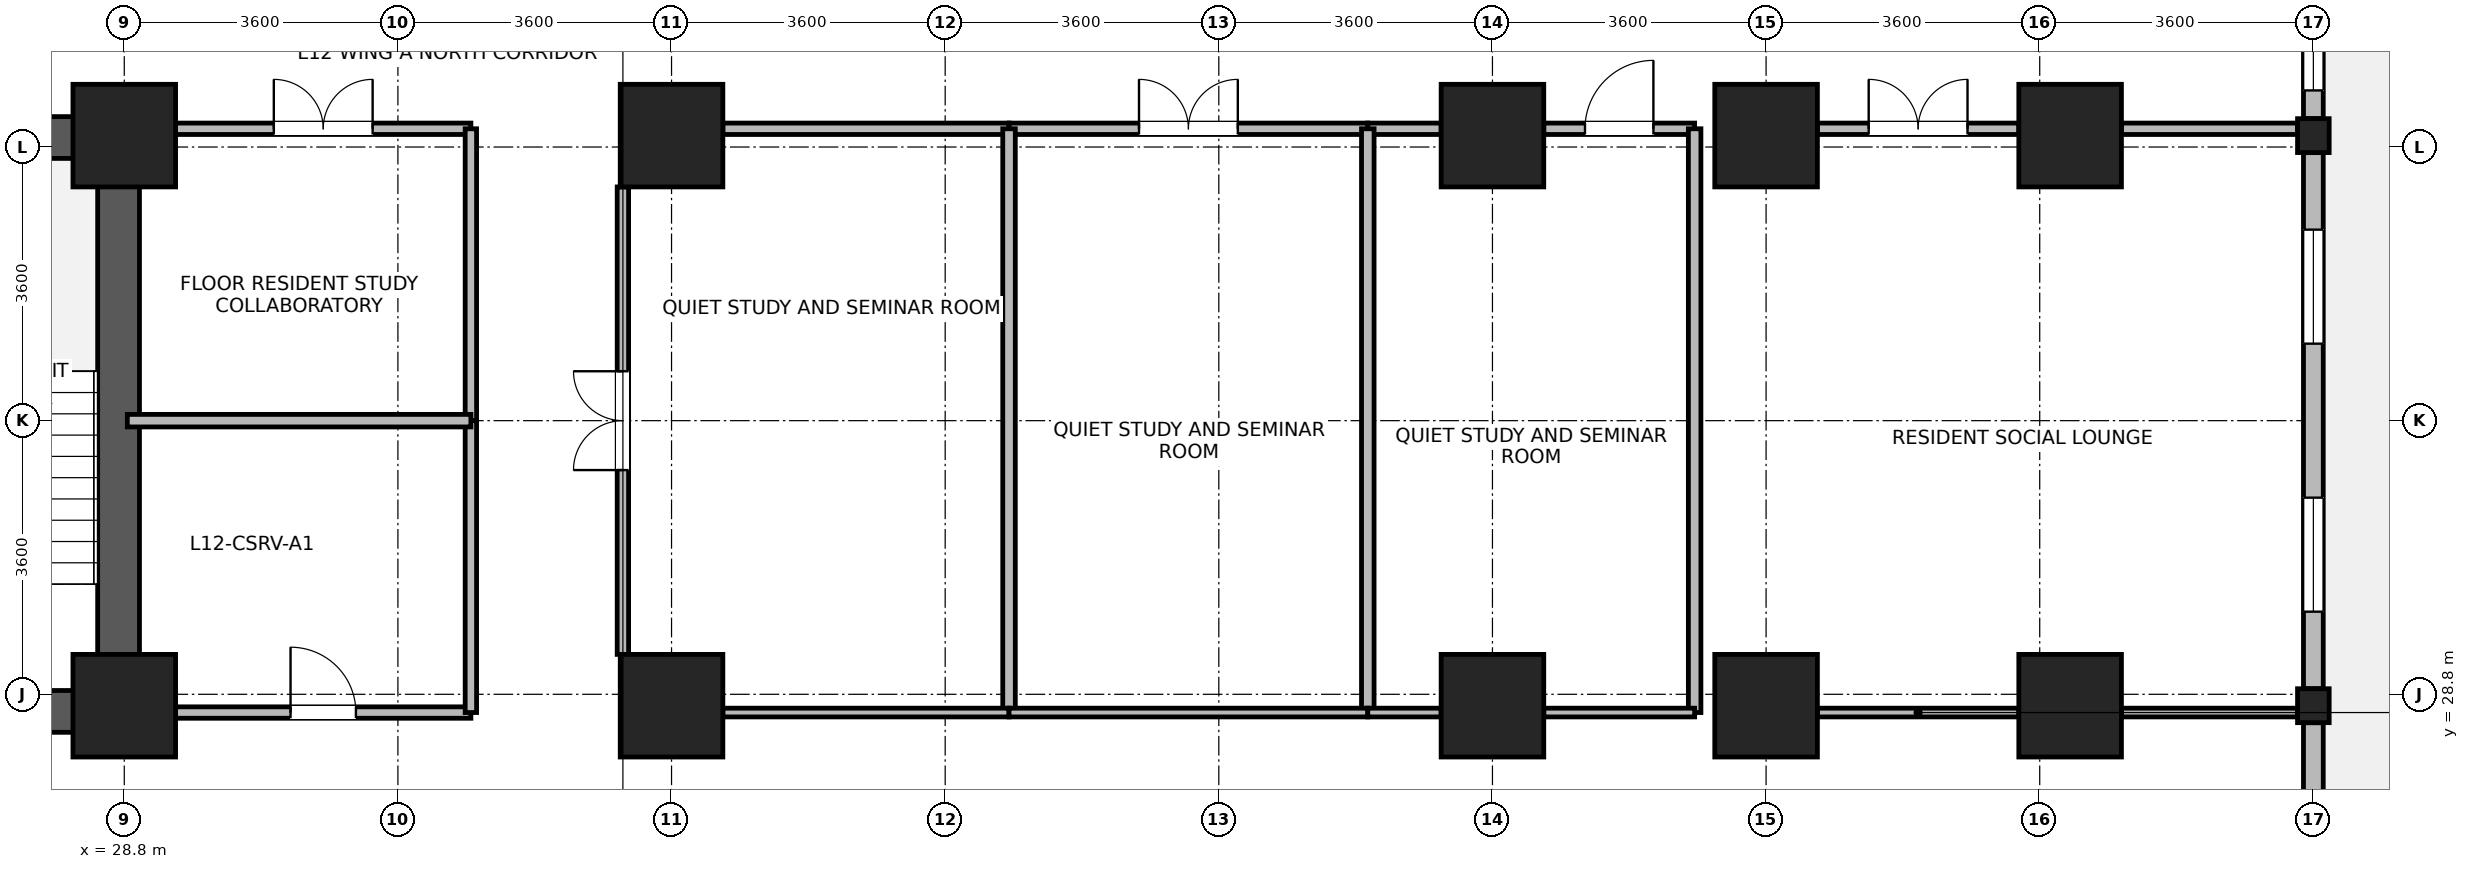
"""IFC4 building model, lengths in metres.
Left out: names, types, materials, properties, quantities, classifications, styles, units other than length and angle.
Written with IfcOpenShell. Run it as: python <this file> out.ifc"""

import sys

from ifc_helpers import new_model, si_unit, direction, frame, frame_2d, origin, origin_2d, place, context, subcontext, project, spatial, rectangle, i_section, extrude, source, transform, mapped, element, fill, save


model = new_model("IFC4")
c1 = context("Model", 3, precision=1e-05, world=origin(), true_north=direction((0.0, 1.0)))
c2 = subcontext(c1, "Body", "Model", "MODEL_VIEW")
j1 = project(units=[si_unit("LENGTHUNIT", "METRE"), si_unit("PLANEANGLEUNIT", "RADIAN")], contexts=[c1])
p1 = place(None, origin())
s1 = spatial("IfcSite", under=j1, at=p1, CompositionType="ELEMENT")
p2 = place(p1, origin())
s2 = spatial("IfcBuilding", under=s1, at=p2, CompositionType="ELEMENT")
p3 = place(p2, frame((0.0, 0.0, 51.2)))
s3 = spatial("IfcBuildingStorey", under=s2, at=p3, CompositionType="ELEMENT", Elevation=51.2)
p4 = place(p3, frame((28.725, 28.3, 0.0), z_axis=(0.0, 0.0, 1.0), x_axis=(0.0, 1.0, 0.0)))
e1 = element("IfcWall", 1, at=p4, inside=s3, PredefinedType="SHEAR", context=c2, shape_type="SweptSolid", body=[
    extrude(rectangle(XDim=8.1, YDim=0.55, at=frame_2d((4.05, 0.0))), origin(), (0.0, 0.0, 1.0), 3.45),
])
for number, where, z_axis, x_axis in (
    (2, (25.25, 28.575, 0.0), (0.0, 0.0, 1.0), (1.0, 0.0, 0.0)),
    (3, (25.25, 36.125, 0.0), (0.0, 0.0, 1.0), (1.0, 0.0, 0.0)),
):
    element("IfcWall", number, at=place(p3, frame(where, z_axis=z_axis, x_axis=x_axis)), inside=s3, PredefinedType="SHEAR", context=c2, shape_type="SweptSolid", body=[
        extrude(rectangle(XDim=3.2, YDim=0.55, at=frame_2d((1.6, 0.0))), origin(), (0.0, 0.0, 1.0), 3.45),
    ])
m1 = source(origin(), c2, "Body", "SweptSolid", [
    extrude(rectangle(XDim=1.35, YDim=1.35, at=origin_2d()), origin(), (0.0, 0.0, 1.0), 3.7),
])
for number, where, z_axis, x_axis in (
    (4, (28.8, 28.65, 0.0), (0.0, 0.0, 1.0), (1.0, 0.0, 0.0)),
    (5, (28.8, 36.15, 0.0), (0.0, 0.0, 1.0), (1.0, 0.0, 0.0)),
    (6, (36.0, 28.65, 0.0), (0.0, 0.0, 1.0), (1.0, 0.0, 0.0)),
    (7, (36.0, 36.15, 0.0), (0.0, 0.0, 1.0), (1.0, 0.0, 0.0)),
    (8, (46.8, 28.65, 0.0), (0.0, 0.0, 1.0), (1.0, 0.0, 0.0)),
    (9, (46.8, 36.15, 0.0), (0.0, 0.0, 1.0), (1.0, 0.0, 0.0)),
    (10, (50.4, 28.65, 0.0), (0.0, 0.0, 1.0), (1.0, 0.0, 0.0)),
    (11, (50.4, 36.15, 0.0), (0.0, 0.0, 1.0), (1.0, 0.0, 0.0)),
    (12, (54.4, 28.65, 0.0), (0.0, 0.0, 1.0), (1.0, 0.0, 0.0)),
    (13, (54.4, 36.15, 0.0), (0.0, 0.0, 1.0), (1.0, 0.0, 0.0)),
):
    element("IfcColumn", number, at=place(p3, frame(where, z_axis=z_axis, x_axis=x_axis)), inside=s3, PredefinedType="COLUMN", context=c2, shape_type="MappedRepresentation", body=[
        mapped(m1, transform((0.0, 0.0, 0.0), x_axis=(1.0, 0.0, 0.0), y_axis=(0.0, 1.0, 0.0), z_axis=(0.0, 0.0, 1.0), scale=1.0)),
    ])
m2 = source(origin(), c2, "Body", "SweptSolid", [
    extrude(i_section(OverallWidth=0.416, OverallDepth=0.446, WebThickness=0.029, FlangeThickness=0.04, FilletRadius=0.015, at=origin_2d()), origin(), (0.0, 0.0, 1.0), 3.7),
])
for number, where, z_axis, x_axis in (
    (14, (57.6, 28.65, 0.0), (0.0, 0.0, 1.0), (1.0, 0.0, 0.0)),
    (15, (57.6, 36.15, 0.0), (0.0, 0.0, 1.0), (1.0, 0.0, 0.0)),
):
    element("IfcColumn", number, at=place(p3, frame(where, z_axis=z_axis, x_axis=x_axis)), inside=s3, PredefinedType="COLUMN", context=c2, shape_type="MappedRepresentation", body=[
        mapped(m2, transform((0.0, 0.0, 0.0), x_axis=(1.0, 0.0, 0.0), y_axis=(0.0, 1.0, 0.0), z_axis=(0.0, 0.0, 1.0), scale=1.0)),
    ])
p5 = place(p3, frame((57.6, 28.426, 0.0), z_axis=(0.0, 0.0, 1.0), x_axis=(0.0, -1.0, 0.0)))
e16 = element("IfcWall", 16, at=p5, inside=s3, PredefinedType="STANDARD", context=c2, shape_type="SweptSolid", body=[
    extrude(rectangle(XDim=6.602, YDim=0.26, at=frame_2d((3.301, 0.0))), origin(), (0.0, 0.0, 1.0), 2.93),
])
p6 = place(p5, frame((4.201, 0.0, 0.85)))
e17 = element("IfcOpeningElement", 17, at=p6, cuts=e16, PredefinedType="OPENING", context=c2, shape_type="SweptSolid", body=[
    extrude(rectangle(XDim=1.5, YDim=1.85, at=frame_2d((0.75, 0.925))), frame((0.0, 0.14, 0.0), z_axis=(0.0, -1.0, 0.0), x_axis=(1.0, 0.0, 0.0)), (0.0, 0.0, 1.0), 0.28),
])
p7 = place(p5, frame((2.826, 0.0, 0.85)))
e18 = element("IfcOpeningElement", 18, at=p7, cuts=e16, PredefinedType="OPENING", context=c2, shape_type="SweptSolid", body=[
    extrude(rectangle(XDim=0.95, YDim=1.75, at=frame_2d((0.475, 0.875))), frame((0.0, 0.14, 0.0), z_axis=(0.0, -1.0, 0.0), x_axis=(1.0, 0.0, 0.0)), (0.0, 0.0, 1.0), 0.28),
])
p8 = place(p3, frame((57.6, 35.926, 0.0), z_axis=(0.0, 0.0, 1.0), x_axis=(0.0, -1.0, 0.0)))
e19 = element("IfcWall", 19, at=p8, inside=s3, PredefinedType="STANDARD", context=c2, shape_type="SweptSolid", body=[
    extrude(rectangle(XDim=7.052, YDim=0.26, at=frame_2d((3.526, 0.0))), origin(), (0.0, 0.0, 1.0), 2.93),
])
p9 = place(p8, frame((1.013, 0.0, 0.85)))
e20 = element("IfcOpeningElement", 20, at=p9, cuts=e19, PredefinedType="OPENING", context=c2, shape_type="SweptSolid", body=[
    extrude(rectangle(XDim=1.5, YDim=1.85, at=frame_2d((0.75, 0.925))), frame((0.0, 0.14, 0.0), z_axis=(0.0, -1.0, 0.0), x_axis=(1.0, 0.0, 0.0)), (0.0, 0.0, 1.0), 0.28),
])
p10 = place(p8, frame((4.539, 0.0, 0.85)))
e21 = element("IfcOpeningElement", 21, at=p10, cuts=e19, PredefinedType="OPENING", context=c2, shape_type="SweptSolid", body=[
    extrude(rectangle(XDim=1.5, YDim=1.85, at=frame_2d((0.75, 0.925))), frame((0.0, 0.14, 0.0), z_axis=(0.0, -1.0, 0.0), x_axis=(1.0, 0.0, 0.0)), (0.0, 0.0, 1.0), 0.28),
])
p11 = place(p3, frame((57.6, 39.73, 0.0), z_axis=(0.0, 0.0, 1.0), x_axis=(0.0, -1.0, 0.0)))
e22 = element("IfcWall", 22, at=p11, inside=s3, PredefinedType="STANDARD", context=c2, shape_type="SweptSolid", body=[
    extrude(rectangle(XDim=3.356, YDim=0.26, at=frame_2d((1.678, 0.0))), origin(), (0.0, 0.0, 1.0), 3.43),
])
p12 = place(p11, frame((2.035, 0.0, 0.85)))
e23 = element("IfcOpeningElement", 23, at=p12, cuts=e22, PredefinedType="OPENING", context=c2, shape_type="SweptSolid", body=[
    extrude(rectangle(XDim=0.95, YDim=1.75, at=frame_2d((0.475, 0.875))), frame((0.0, 0.14, 0.0), z_axis=(0.0, -1.0, 0.0), x_axis=(1.0, 0.0, 0.0)), (0.0, 0.0, 1.0), 0.28),
])
p13 = place(p11, frame((0.263, 0.0, 0.85)))
e24 = element("IfcOpeningElement", 24, at=p13, cuts=e22, PredefinedType="OPENING", context=c2, shape_type="SweptSolid", body=[
    extrude(rectangle(XDim=0.95, YDim=1.75, at=frame_2d((0.475, 0.875))), frame((0.0, 0.14, 0.0), z_axis=(0.0, -1.0, 0.0), x_axis=(1.0, 0.0, 0.0)), (0.0, 0.0, 1.0), 0.28),
])
p14 = place(p3, frame((51.075, 36.24, 0.0), z_axis=(0.0, 0.0, 1.0), x_axis=(1.0, 0.0, 0.0)))
e25 = element("IfcWall", 25, at=p14, inside=s3, PredefinedType="PARTITIONING", context=c2, shape_type="SweptSolid", body=[
    extrude(rectangle(XDim=2.65, YDim=0.15, at=frame_2d((1.325, 0.0))), origin(), (0.0, 0.0, 1.0), 2.78),
])
p15 = place(p14, frame((0.675, 0.0, 0.0)))
e26 = element("IfcOpeningElement", 26, at=p15, cuts=e25, PredefinedType="OPENING", context=c2, shape_type="SweptSolid", body=[
    extrude(rectangle(XDim=1.3, YDim=2.12, at=frame_2d((0.65, 1.06))), frame((0.0, 0.085, 0.0), z_axis=(0.0, -1.0, 0.0), x_axis=(1.0, 0.0, 0.0)), (0.0, 0.0, 1.0), 0.17),
])
p16 = place(p3, frame((55.075, 36.24, 0.0), z_axis=(0.0, 0.0, 1.0), x_axis=(1.0, 0.0, 0.0)))
e27 = element("IfcWall", 27, at=p16, inside=s3, PredefinedType="PARTITIONING", context=c2, shape_type="SweptSolid", body=[
    extrude(rectangle(XDim=2.317, YDim=0.15, at=frame_2d((1.159, 0.0))), origin(), (0.0, 0.0, 1.0), 2.78),
])
p17 = place(p3, frame((35.36, 29.325, 0.0), z_axis=(0.0, 0.0, 1.0), x_axis=(0.0, 1.0, 0.0)))
e28 = element("IfcWall", 28, at=p17, inside=s3, PredefinedType="PARTITIONING", context=c2, shape_type="SweptSolid", body=[
    extrude(rectangle(XDim=6.15, YDim=0.15, at=frame_2d((3.075, 0.0))), origin(), (0.0, 0.0, 1.0), 3.43),
])
p18 = place(p17, frame((2.425, 0.0, 0.0)))
e29 = element("IfcOpeningElement", 29, at=p18, cuts=e28, PredefinedType="OPENING", context=c2, shape_type="SweptSolid", body=[
    extrude(rectangle(XDim=1.3, YDim=2.12, at=frame_2d((0.65, 1.06))), frame((0.0, 0.085, 0.0), z_axis=(0.0, -1.0, 0.0), x_axis=(1.0, 0.0, 0.0)), (0.0, 0.0, 1.0), 0.17),
])
p19 = place(p3, frame((36.675, 36.24, 0.0), z_axis=(0.0, 0.0, 1.0), x_axis=(1.0, 0.0, 0.0)))
e30 = element("IfcWall", 30, at=p19, inside=s3, PredefinedType="PARTITIONING", context=c2, shape_type="SweptSolid", body=[
    extrude(rectangle(XDim=3.765, YDim=0.15, at=frame_2d((1.882, 0.0))), origin(), (0.0, 0.0, 1.0), 2.78),
])
p20 = place(p3, frame((40.44, 36.24, 0.0), z_axis=(0.0, 0.0, 1.0), x_axis=(1.0, 0.0, 0.0)))
e31 = element("IfcWall", 31, at=p20, inside=s3, PredefinedType="PARTITIONING", context=c2, shape_type="SweptSolid", body=[
    extrude(rectangle(XDim=4.72, YDim=0.15, at=frame_2d((2.36, 0.0))), origin(), (0.0, 0.0, 1.0), 2.78),
])
p21 = place(p20, frame((1.71, 0.0, 0.0)))
e32 = element("IfcOpeningElement", 32, at=p21, cuts=e31, PredefinedType="OPENING", context=c2, shape_type="SweptSolid", body=[
    extrude(rectangle(XDim=1.3, YDim=2.12, at=frame_2d((0.65, 1.06))), frame((0.0, 0.085, 0.0), z_axis=(0.0, -1.0, 0.0), x_axis=(1.0, 0.0, 0.0)), (0.0, 0.0, 1.0), 0.17),
])
p22 = place(p3, frame((29.475, 28.56, 0.0), z_axis=(0.0, 0.0, 1.0), x_axis=(1.0, 0.0, 0.0)))
e33 = element("IfcWall", 33, at=p22, inside=s3, PredefinedType="PARTITIONING", context=c2, shape_type="SweptSolid", body=[
    extrude(rectangle(XDim=3.885, YDim=0.15, at=frame_2d((1.942, 0.0))), origin(), (0.0, 0.0, 1.0), 2.78),
])
p23 = place(p22, frame((1.512, 0.0, 0.0)))
e34 = element("IfcOpeningElement", 34, at=p23, cuts=e33, PredefinedType="OPENING", context=c2, shape_type="SweptSolid", body=[
    extrude(rectangle(XDim=0.86, YDim=2.02, at=frame_2d((0.43, 1.01))), frame((0.0, 0.085, 0.0), z_axis=(0.0, -1.0, 0.0), x_axis=(1.0, 0.0, 0.0)), (0.0, 0.0, 1.0), 0.17),
])
p24 = place(p3, frame((29.475, 36.24, 0.0), z_axis=(0.0, 0.0, 1.0), x_axis=(1.0, 0.0, 0.0)))
e35 = element("IfcWall", 35, at=p24, inside=s3, PredefinedType="PARTITIONING", context=c2, shape_type="SweptSolid", body=[
    extrude(rectangle(XDim=3.885, YDim=0.15, at=frame_2d((1.942, 0.0))), origin(), (0.0, 0.0, 1.0), 2.78),
])
p25 = place(p24, frame((1.292, 0.0, 0.0)))
e36 = element("IfcOpeningElement", 36, at=p25, cuts=e35, PredefinedType="OPENING", context=c2, shape_type="SweptSolid", body=[
    extrude(rectangle(XDim=1.3, YDim=2.12, at=frame_2d((0.65, 1.06))), frame((0.0, 0.085, 0.0), z_axis=(0.0, -1.0, 0.0), x_axis=(1.0, 0.0, 0.0)), (0.0, 0.0, 1.0), 0.17),
])
p26 = place(p3, frame((45.16, 36.24, 0.0), z_axis=(0.0, 0.0, 1.0), x_axis=(1.0, 0.0, 0.0)))
e37 = element("IfcWall", 37, at=p26, inside=s3, PredefinedType="PARTITIONING", context=c2, shape_type="SweptSolid", body=[
    extrude(rectangle(XDim=0.965, YDim=0.15, at=frame_2d((0.482, 0.0))), origin(), (0.0, 0.0, 1.0), 2.78),
])
p27 = place(p3, frame((47.475, 36.24, 0.0), z_axis=(0.0, 0.0, 1.0), x_axis=(1.0, 0.0, 0.0)))
e38 = element("IfcWall", 38, at=p27, inside=s3, PredefinedType="PARTITIONING", context=c2, shape_type="SweptSolid", body=[
    extrude(rectangle(XDim=1.985, YDim=0.15, at=frame_2d((0.992, 0.0))), origin(), (0.0, 0.0, 1.0), 2.78),
])
p28 = place(p27, frame((0.542, 0.0, 0.0)))
e39 = element("IfcOpeningElement", 39, at=p28, cuts=e38, PredefinedType="OPENING", context=c2, shape_type="SweptSolid", body=[
    extrude(rectangle(XDim=0.9, YDim=2.08, at=frame_2d((0.45, 1.04))), frame((0.0, 0.085, 0.0), z_axis=(0.0, -1.0, 0.0), x_axis=(1.0, 0.0, 0.0)), (0.0, 0.0, 1.0), 0.17),
])
p29 = place(p3, frame((33.36, 32.4, 0.0), z_axis=(0.0, 0.0, 1.0), x_axis=(0.0, 1.0, 0.0)))
e40 = element("IfcWall", 40, at=p29, inside=s3, PredefinedType="PARTITIONING", context=c2, shape_type="SweptSolid", body=[
    extrude(rectangle(XDim=3.84, YDim=0.15, at=frame_2d((1.92, 0.0))), origin(), (0.0, 0.0, 1.0), 3.43),
])
p30 = place(p3, frame((33.36, 28.56, 0.0), z_axis=(0.0, 0.0, 1.0), x_axis=(0.0, 1.0, 0.0)))
e41 = element("IfcWall", 41, at=p30, inside=s3, PredefinedType="PARTITIONING", context=c2, shape_type="SweptSolid", body=[
    extrude(rectangle(XDim=3.84, YDim=0.15, at=frame_2d((1.92, 0.0))), origin(), (0.0, 0.0, 1.0), 3.43),
])
p31 = place(p3, frame((51.075, 28.56, 0.0), z_axis=(0.0, 0.0, 1.0), x_axis=(1.0, 0.0, 0.0)))
e42 = element("IfcWall", 42, at=p31, inside=s3, PredefinedType="PARTITIONING", context=c2, shape_type="SweptSolid", body=[
    extrude(rectangle(XDim=2.65, YDim=0.115, at=frame_2d((1.325, 0.0))), origin(), (0.0, 0.0, 1.0), 2.78),
])
p32 = place(p3, frame((55.075, 28.56, 0.0), z_axis=(0.0, 0.0, 1.0), x_axis=(1.0, 0.0, 0.0)))
e43 = element("IfcWall", 43, at=p32, inside=s3, PredefinedType="PARTITIONING", context=c2, shape_type="SweptSolid", body=[
    extrude(rectangle(XDim=2.317, YDim=0.115, at=frame_2d((1.159, 0.0))), origin(), (0.0, 0.0, 1.0), 2.78),
])
for number, where, z_axis, x_axis in (
    (44, (40.44, 28.56, 0.0), (0.0, 0.0, 1.0), (0.0, 1.0, 0.0)),
    (45, (45.16, 28.56, 0.0), (0.0, 0.0, 1.0), (0.0, 1.0, 0.0)),
    (46, (49.46, 28.56, 0.0), (0.0, 0.0, 1.0), (0.0, 1.0, 0.0)),
):
    element("IfcWall", number, at=place(p3, frame(where, z_axis=z_axis, x_axis=x_axis)), inside=s3, PredefinedType="PARTITIONING", context=c2, shape_type="SweptSolid", body=[
        extrude(rectangle(XDim=7.68, YDim=0.165, at=frame_2d((3.84, 0.0))), origin(), (0.0, 0.0, 1.0), 3.43),
    ])
p33 = place(p3, frame((36.675, 28.56, 0.0), z_axis=(0.0, 0.0, 1.0), x_axis=(1.0, 0.0, 0.0)))
e47 = element("IfcWall", 47, at=p33, inside=s3, PredefinedType="PARTITIONING", context=c2, shape_type="SweptSolid", body=[
    extrude(rectangle(XDim=3.765, YDim=0.115, at=frame_2d((1.882, 0.0))), origin(), (0.0, 0.0, 1.0), 2.78),
])
p34 = place(p3, frame((40.44, 28.56, 0.0), z_axis=(0.0, 0.0, 1.0), x_axis=(1.0, 0.0, 0.0)))
e48 = element("IfcWall", 48, at=p34, inside=s3, PredefinedType="PARTITIONING", context=c2, shape_type="SweptSolid", body=[
    extrude(rectangle(XDim=4.72, YDim=0.115, at=frame_2d((2.36, 0.0))), origin(), (0.0, 0.0, 1.0), 2.78),
])
p35 = place(p3, frame((28.84, 32.4, 0.0), z_axis=(0.0, 0.0, 1.0), x_axis=(1.0, 0.0, 0.0)))
e49 = element("IfcWall", 49, at=p35, inside=s3, PredefinedType="PARTITIONING", context=c2, shape_type="SweptSolid", body=[
    extrude(rectangle(XDim=4.52, YDim=0.165, at=frame_2d((2.26, 0.0))), origin(), (0.0, 0.0, 1.0), 3.43),
])
p36 = place(p3, frame((45.16, 28.56, 0.0), z_axis=(0.0, 0.0, 1.0), x_axis=(1.0, 0.0, 0.0)))
e50 = element("IfcWall", 50, at=p36, inside=s3, PredefinedType="PARTITIONING", context=c2, shape_type="SweptSolid", body=[
    extrude(rectangle(XDim=0.965, YDim=0.115, at=frame_2d((0.482, 0.0))), origin(), (0.0, 0.0, 1.0), 2.78),
])
p37 = place(p3, frame((47.475, 28.56, 0.0), z_axis=(0.0, 0.0, 1.0), x_axis=(1.0, 0.0, 0.0)))
e51 = element("IfcWall", 51, at=p37, inside=s3, PredefinedType="PARTITIONING", context=c2, shape_type="SweptSolid", body=[
    extrude(rectangle(XDim=1.985, YDim=0.115, at=frame_2d((0.992, 0.0))), origin(), (0.0, 0.0, 1.0), 2.78),
])
p38 = place(p9, origin())
e52 = element("IfcWindow", 52, at=p38, inside=s3, PartitioningType="SINGLE_PANEL", PredefinedType="WINDOW", context=c2, shape_type="SweptSolid", body=[
    extrude(rectangle(XDim=1.5, YDim=1.85, at=frame_2d((0.75, 0.925))), frame((0.0, 0.03, 0.0), z_axis=(0.0, -1.0, 0.0), x_axis=(1.0, 0.0, 0.0)), (0.0, 0.0, 1.0), 0.06),
])
fill(e20, e52)
p39 = place(p10, origin())
e53 = element("IfcWindow", 53, at=p39, inside=s3, PartitioningType="SINGLE_PANEL", PredefinedType="WINDOW", context=c2, shape_type="SweptSolid", body=[
    extrude(rectangle(XDim=1.5, YDim=1.85, at=frame_2d((0.75, 0.925))), frame((0.0, 0.03, 0.0), z_axis=(0.0, -1.0, 0.0), x_axis=(1.0, 0.0, 0.0)), (0.0, 0.0, 1.0), 0.06),
])
fill(e21, e53)
p40 = place(p12, origin())
e54 = element("IfcWindow", 54, at=p40, inside=s3, PartitioningType="SINGLE_PANEL", PredefinedType="WINDOW", context=c2, shape_type="SweptSolid", body=[
    extrude(rectangle(XDim=0.95, YDim=1.75, at=frame_2d((0.475, 0.875))), frame((0.0, 0.03, 0.0), z_axis=(0.0, -1.0, 0.0), x_axis=(1.0, 0.0, 0.0)), (0.0, 0.0, 1.0), 0.06),
])
fill(e23, e54)
p41 = place(p15, origin())
e55 = element("IfcDoor", 55, at=p41, inside=s3, OperationType="DOUBLE_DOOR_SINGLE_SWING", PredefinedType="DOOR", context=c2, shape_type="SweptSolid", body=[
    extrude(rectangle(XDim=1.3, YDim=2.12, at=frame_2d((0.65, 1.06))), frame((0.0, 0.025, 0.0), z_axis=(0.0, -1.0, 0.0), x_axis=(1.0, 0.0, 0.0)), (0.0, 0.0, 1.0), 0.05),
])
fill(e26, e55)
p42 = place(p18, origin())
e56 = element("IfcDoor", 56, at=p42, inside=s3, OperationType="DOUBLE_DOOR_SINGLE_SWING", PredefinedType="DOOR", context=c2, shape_type="SweptSolid", body=[
    extrude(rectangle(XDim=1.3, YDim=2.12, at=frame_2d((0.65, 1.06))), frame((0.0, 0.025, 0.0), z_axis=(0.0, -1.0, 0.0), x_axis=(1.0, 0.0, 0.0)), (0.0, 0.0, 1.0), 0.05),
])
fill(e29, e56)
p43 = place(p21, origin())
e57 = element("IfcDoor", 57, at=p43, inside=s3, OperationType="DOUBLE_DOOR_SINGLE_SWING", PredefinedType="DOOR", context=c2, shape_type="SweptSolid", body=[
    extrude(rectangle(XDim=1.3, YDim=2.12, at=frame_2d((0.65, 1.06))), frame((0.0, 0.025, 0.0), z_axis=(0.0, -1.0, 0.0), x_axis=(1.0, 0.0, 0.0)), (0.0, 0.0, 1.0), 0.05),
])
fill(e32, e57)
p44 = place(p23, origin())
e58 = element("IfcDoor", 58, at=p44, inside=s3, OperationType="SINGLE_SWING_LEFT", PredefinedType="DOOR", context=c2, shape_type="SweptSolid", body=[
    extrude(rectangle(XDim=0.86, YDim=2.02, at=frame_2d((0.43, 1.01))), frame((0.0, 0.025, 0.0), z_axis=(0.0, -1.0, 0.0), x_axis=(1.0, 0.0, 0.0)), (0.0, 0.0, 1.0), 0.05),
])
fill(e34, e58)
p45 = place(p25, origin())
e59 = element("IfcDoor", 59, at=p45, inside=s3, OperationType="DOUBLE_DOOR_SINGLE_SWING", PredefinedType="DOOR", context=c2, shape_type="SweptSolid", body=[
    extrude(rectangle(XDim=1.3, YDim=2.12, at=frame_2d((0.65, 1.06))), frame((0.0, 0.025, 0.0), z_axis=(0.0, -1.0, 0.0), x_axis=(1.0, 0.0, 0.0)), (0.0, 0.0, 1.0), 0.05),
])
fill(e36, e59)
p46 = place(p28, origin())
e60 = element("IfcDoor", 60, at=p46, inside=s3, OperationType="SINGLE_SWING_RIGHT", PredefinedType="DOOR", context=c2, shape_type="SweptSolid", body=[
    extrude(rectangle(XDim=0.9, YDim=2.08, at=frame_2d((0.45, 1.04))), frame((0.0, 0.025, 0.0), z_axis=(0.0, -1.0, 0.0), x_axis=(1.0, 0.0, 0.0)), (0.0, 0.0, 1.0), 0.05),
])
fill(e39, e60)
save(model, sys.argv[1])
